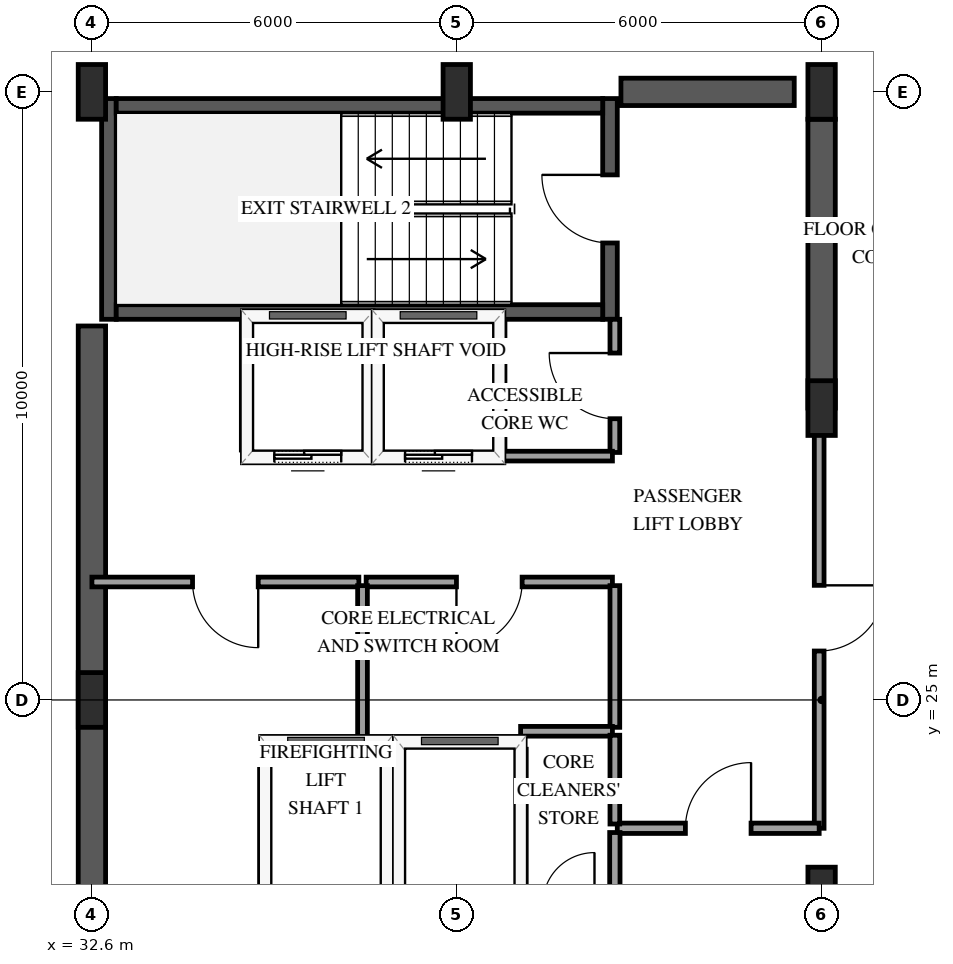
"""IFC4 building model, lengths in metres.
Left out: names, types, materials, properties, quantities, classifications, styles, units other than length and angle.
Written with IfcOpenShell. Run it as: python <this file> out.ifc"""

import sys

from ifc_helpers import new_model, si_unit, direction, frame, frame_2d, origin, origin_2d, place, context, subcontext, project, spatial, rectangle, extrude, element, fill, save


model = new_model("IFC4")
c1 = context("Model", 3, precision=1e-05, world=origin(), true_north=direction((0.0, 1.0)))
c2 = subcontext(c1, "Body", "Model", "MODEL_VIEW")
j1 = project(units=[si_unit("LENGTHUNIT", "METRE"), si_unit("PLANEANGLEUNIT", "RADIAN")], contexts=[c1])
p1 = place(None, origin())
s1 = spatial("IfcSite", under=j1, at=p1, CompositionType="ELEMENT")
p2 = place(p1, origin())
s2 = spatial("IfcBuilding", under=s1, at=p2, CompositionType="ELEMENT")
p3 = place(p2, frame((0.0, 0.0, 261.25)))
s3 = spatial("IfcBuildingStorey", under=s2, at=p3, CompositionType="ELEMENT", Elevation=261.25)
p4 = place(p3, frame((32.88, 31.26, 0.0), z_axis=(0.0, 0.0, 1.0), x_axis=(0.0, 1.0, 0.0)))
e1 = element("IfcWall", 1, at=p4, inside=s3, PredefinedType="SHEAR", context=c2, shape_type="SweptSolid", body=[
    extrude(rectangle(XDim=3.63, YDim=0.24, at=frame_2d((1.815, 0.0))), origin(), (0.0, 0.0, 1.0), 3.75),
])
p5 = place(p3, frame((41.12, 31.26, 0.0), z_axis=(0.0, 0.0, 1.0), x_axis=(0.0, 1.0, 0.0)))
e2 = element("IfcWall", 2, at=p5, inside=s3, PredefinedType="SHEAR", context=c2, shape_type="SweptSolid", body=[
    extrude(rectangle(XDim=3.63, YDim=0.24, at=frame_2d((1.815, 0.0))), origin(), (0.0, 0.0, 1.0), 3.75),
])
p6 = place(p5, frame((1.255, 0.0, 0.0)))
e3 = element("IfcOpeningElement", 3, at=p6, cuts=e2, PredefinedType="OPENING", context=c2, shape_type="SweptSolid", body=[
    extrude(rectangle(XDim=1.12, YDim=2.15, at=frame_2d((0.56, 1.075))), frame((0.0, 0.13, 0.0), z_axis=(0.0, -1.0, 0.0), x_axis=(1.0, 0.0, 0.0)), (0.0, 0.0, 1.0), 0.26),
])
for number, where, z_axis, x_axis in (
    (4, (33.0, 31.38, 0.0), (0.0, 0.0, 1.0), (1.0, 0.0, 0.0)),
    (5, (33.0, 34.77, 0.0), (0.0, 0.0, 1.0), (1.0, 0.0, 0.0)),
):
    element("IfcWall", number, at=place(p3, frame(where, z_axis=z_axis, x_axis=x_axis)), inside=s3, PredefinedType="SHEAR", context=c2, shape_type="SweptSolid", body=[
        extrude(rectangle(XDim=8.0, YDim=0.24, at=frame_2d((4.0, 0.0))), origin(), (0.0, 0.0, 1.0), 3.75),
    ])
p7 = place(p3, frame((32.6, 18.85, 0.0), z_axis=(0.0, 0.0, 1.0), x_axis=(0.0, 1.0, 0.0)))
e6 = element("IfcWall", 6, at=p7, inside=s3, PredefinedType="SHEAR", context=c2, shape_type="SweptSolid", body=[
    extrude(rectangle(XDim=12.3, YDim=0.45, at=frame_2d((6.15, 0.0))), origin(), (0.0, 0.0, 1.0), 3.75),
])
p8 = place(p3, frame((41.3, 35.0, 0.0), z_axis=(0.0, 0.0, 1.0), x_axis=(1.0, 0.0, 0.0)))
e7 = element("IfcWall", 7, at=p8, inside=s3, PredefinedType="SHEAR", context=c2, shape_type="SweptSolid", body=[
    extrude(rectangle(XDim=2.85, YDim=0.45, at=frame_2d((1.425, 0.0))), origin(), (0.0, 0.0, 1.0), 3.75),
])
p9 = place(p3, frame((44.6, 29.8, 0.0), z_axis=(0.0, 0.0, 1.0), x_axis=(0.0, 1.0, 0.0)))
e8 = element("IfcWall", 8, at=p9, inside=s3, PredefinedType="SHEAR", context=c2, shape_type="SweptSolid", body=[
    extrude(rectangle(XDim=4.75, YDim=0.45, at=frame_2d((2.375, 0.0))), origin(), (0.0, 0.0, 1.0), 3.75),
])
for number, where, z_axis, x_axis in (
    (9, (32.6, 25.0, 0.0), (0.0, 0.0, 1.0), (1.0, 0.0, 0.0)),
    (10, (32.6, 35.0, 0.0), (0.0, 0.0, 1.0), (1.0, 0.0, 0.0)),
    (11, (38.6, 35.0, 0.0), (0.0, 0.0, 1.0), (1.0, 0.0, 0.0)),
    (12, (44.6, 21.8, 0.0), (0.0, 0.0, 1.0), (1.0, 0.0, 0.0)),
    (13, (44.6, 29.8, 0.0), (0.0, 0.0, 1.0), (1.0, 0.0, 0.0)),
    (14, (44.6, 35.0, 0.0), (0.0, 0.0, 1.0), (1.0, 0.0, 0.0)),
):
    element("IfcColumn", number, at=place(p3, frame(where, z_axis=z_axis, x_axis=x_axis)), inside=s3, PredefinedType="PILASTER", context=c2, shape_type="SweptSolid", body=[
        extrude(rectangle(XDim=0.45, YDim=0.9, at=origin_2d()), origin(), (0.0, 0.0, 1.0), 3.75),
    ])
p10 = place(p3, frame((35.45, 24.3, 0.0), z_axis=(0.0, 0.0, 1.0), x_axis=(1.0, 0.0, 0.0)))
e15 = element("IfcWall", 15, at=p10, inside=s3, PredefinedType="SOLIDWALL", context=c2, shape_type="SweptSolid", body=[
    extrude(rectangle(XDim=2.0, YDim=0.185, at=frame_2d((1.0, 0.0))), origin(), (0.0, 0.0, 1.0), 3.45),
])
for number, where, z_axis, x_axis in (
    (16, (35.45, 21.81, 0.0), (0.0, 0.0, 1.0), (0.0, 1.0, 0.0)),
    (17, (37.45, 21.81, 0.0), (0.0, 0.0, 1.0), (0.0, 1.0, 0.0)),
):
    element("IfcWall", number, at=place(p3, frame(where, z_axis=z_axis, x_axis=x_axis)), inside=s3, PredefinedType="SOLIDWALL", context=c2, shape_type="SweptSolid", body=[
        extrude(rectangle(XDim=2.38, YDim=0.185, at=frame_2d((1.19, 0.0))), origin(), (0.0, 0.0, 1.0), 3.45),
    ])
p11 = place(p3, frame((37.65, 24.3, 0.0), z_axis=(0.0, 0.0, 1.0), x_axis=(1.0, 0.0, 0.0)))
e18 = element("IfcWall", 18, at=p11, inside=s3, PredefinedType="SOLIDWALL", context=c2, shape_type="SweptSolid", body=[
    extrude(rectangle(XDim=2.0, YDim=0.185, at=frame_2d((1.0, 0.0))), origin(), (0.0, 0.0, 1.0), 3.45),
])
p12 = place(p3, frame((39.65, 21.81, 0.0), z_axis=(0.0, 0.0, 1.0), x_axis=(0.0, 1.0, 0.0)))
e19 = element("IfcWall", 19, at=p12, inside=s3, PredefinedType="SOLIDWALL", context=c2, shape_type="SweptSolid", body=[
    extrude(rectangle(XDim=2.38, YDim=0.185, at=frame_2d((1.19, 0.0))), origin(), (0.0, 0.0, 1.0), 3.45),
])
p13 = place(p3, frame((35.15, 29.0, 0.0), z_axis=(0.0, 0.0, 1.0), x_axis=(1.0, 0.0, 0.0)))
e20 = element("IfcWall", 20, at=p13, inside=s3, PredefinedType="SOLIDWALL", context=c2, shape_type="SweptSolid", body=[
    extrude(rectangle(XDim=2.0, YDim=0.185, at=frame_2d((1.0, 0.0))), origin(), (0.0, 0.0, 1.0), 3.45),
])
p14 = place(p13, frame((0.45, 0.0, 0.0)))
e21 = element("IfcOpeningElement", 21, at=p14, cuts=e20, PredefinedType="OPENING", context=c2, shape_type="SweptSolid", body=[
    extrude(rectangle(XDim=1.1, YDim=2.15, at=frame_2d((0.55, 1.075))), frame((0.0, 0.103, 0.0), z_axis=(0.0, -1.0, 0.0), x_axis=(1.0, 0.0, 0.0)), (0.0, 0.0, 1.0), 0.205),
])
for number, where, z_axis, x_axis in (
    (22, (35.15, 29.11, 0.0), (0.0, 0.0, 1.0), (0.0, 1.0, 0.0)),
    (23, (37.15, 29.11, 0.0), (0.0, 0.0, 1.0), (0.0, 1.0, 0.0)),
):
    element("IfcWall", number, at=place(p3, frame(where, z_axis=z_axis, x_axis=x_axis)), inside=s3, PredefinedType="SOLIDWALL", context=c2, shape_type="SweptSolid", body=[
        extrude(rectangle(XDim=2.1, YDim=0.185, at=frame_2d((1.05, 0.0))), origin(), (0.0, 0.0, 1.0), 3.45),
    ])
p15 = place(p3, frame((37.3, 29.0, 0.0), z_axis=(0.0, 0.0, 1.0), x_axis=(1.0, 0.0, 0.0)))
e24 = element("IfcWall", 24, at=p15, inside=s3, PredefinedType="SOLIDWALL", context=c2, shape_type="SweptSolid", body=[
    extrude(rectangle(XDim=2.0, YDim=0.185, at=frame_2d((1.0, 0.0))), origin(), (0.0, 0.0, 1.0), 3.45),
])
p16 = place(p15, frame((0.45, 0.0, 0.0)))
e25 = element("IfcOpeningElement", 25, at=p16, cuts=e24, PredefinedType="OPENING", context=c2, shape_type="SweptSolid", body=[
    extrude(rectangle(XDim=1.1, YDim=2.15, at=frame_2d((0.55, 1.075))), frame((0.0, 0.103, 0.0), z_axis=(0.0, -1.0, 0.0), x_axis=(1.0, 0.0, 0.0)), (0.0, 0.0, 1.0), 0.205),
])
p17 = place(p3, frame((39.3, 29.11, 0.0), z_axis=(0.0, 0.0, 1.0), x_axis=(0.0, 1.0, 0.0)))
e26 = element("IfcWall", 26, at=p17, inside=s3, PredefinedType="SOLIDWALL", context=c2, shape_type="SweptSolid", body=[
    extrude(rectangle(XDim=2.1, YDim=0.185, at=frame_2d((1.05, 0.0))), origin(), (0.0, 0.0, 1.0), 3.45),
])
p18 = place(p3, frame((44.56, 29.8, 0.0), z_axis=(0.0, 0.0, 1.0), x_axis=(0.0, -1.0, 0.0)))
e27 = element("IfcWall", 27, at=p18, inside=s3, PredefinedType="PARTITIONING", context=c2, shape_type="SweptSolid", body=[
    extrude(rectangle(XDim=6.91, YDim=0.16, at=frame_2d((3.455, 0.0))), origin(), (0.0, 0.0, 1.0), 2.49),
])
p19 = place(p18, frame((2.915, 0.0, 0.0)))
e28 = element("IfcOpeningElement", 28, at=p19, cuts=e27, PredefinedType="OPENING", context=c2, shape_type="SweptSolid", body=[
    extrude(rectangle(XDim=1.08, YDim=2.15, at=frame_2d((0.54, 1.075))), frame((0.0, 0.09, 0.0), z_axis=(0.0, -1.0, 0.0), x_axis=(1.0, 0.0, 0.0)), (0.0, 0.0, 1.0), 0.18),
])
p20 = place(p3, frame((36.99, 26.94, 0.0), z_axis=(0.0, 0.0, 1.0), x_axis=(-1.0, 0.0, 0.0)))
e29 = element("IfcWall", 29, at=p20, inside=s3, PredefinedType="PARTITIONING", context=c2, shape_type="SweptSolid", body=[
    extrude(rectangle(XDim=4.39, YDim=0.16, at=frame_2d((2.195, 0.0))), origin(), (0.0, 0.0, 1.0), 3.45),
])
p21 = place(p20, frame((1.655, 0.0, 0.0)))
e30 = element("IfcOpeningElement", 30, at=p21, cuts=e29, PredefinedType="OPENING", context=c2, shape_type="SweptSolid", body=[
    extrude(rectangle(XDim=1.08, YDim=2.15, at=frame_2d((0.54, 1.075))), frame((0.0, 0.09, 0.0), z_axis=(0.0, -1.0, 0.0), x_axis=(1.0, 0.0, 0.0)), (0.0, 0.0, 1.0), 0.18),
])
p22 = place(p3, frame((41.16, 26.94, 0.0), z_axis=(0.0, 0.0, 1.0), x_axis=(-1.0, 0.0, 0.0)))
e31 = element("IfcWall", 31, at=p22, inside=s3, PredefinedType="PARTITIONING", context=c2, shape_type="SweptSolid", body=[
    extrude(rectangle(XDim=4.05, YDim=0.16, at=frame_2d((2.025, 0.0))), origin(), (0.0, 0.0, 1.0), 3.45),
])
p23 = place(p22, frame((1.485, 0.0, 0.0)))
e32 = element("IfcOpeningElement", 32, at=p23, cuts=e31, PredefinedType="OPENING", context=c2, shape_type="SweptSolid", body=[
    extrude(rectangle(XDim=1.08, YDim=2.15, at=frame_2d((0.54, 1.075))), frame((0.0, 0.09, 0.0), z_axis=(0.0, -1.0, 0.0), x_axis=(1.0, 0.0, 0.0)), (0.0, 0.0, 1.0), 0.18),
])
p24 = place(p3, frame((41.24, 22.89, 0.0), z_axis=(0.0, 0.0, 1.0), x_axis=(1.0, 0.0, 0.0)))
e33 = element("IfcWall", 33, at=p24, inside=s3, PredefinedType="PARTITIONING", context=c2, shape_type="SweptSolid", body=[
    extrude(rectangle(XDim=3.32, YDim=0.17, at=frame_2d((1.66, 0.0))), origin(), (0.0, 0.0, 1.0), 3.45),
])
p25 = place(p24, frame((1.12, 0.0, 0.0)))
e34 = element("IfcOpeningElement", 34, at=p25, cuts=e33, PredefinedType="OPENING", context=c2, shape_type="SweptSolid", body=[
    extrude(rectangle(XDim=1.08, YDim=2.15, at=frame_2d((0.54, 1.075))), frame((0.0, 0.095, 0.0), z_axis=(0.0, -1.0, 0.0), x_axis=(1.0, 0.0, 0.0)), (0.0, 0.0, 1.0), 0.19),
])
p26 = place(p3, frame((37.05, 26.88, 0.0), z_axis=(0.0, 0.0, 1.0), x_axis=(0.0, -1.0, 0.0)))
e35 = element("IfcWall", 35, at=p26, inside=s3, PredefinedType="PARTITIONING", context=c2, shape_type="SweptSolid", body=[
    extrude(rectangle(XDim=2.58, YDim=0.16, at=frame_2d((1.29, 0.0))), origin(), (0.0, 0.0, 1.0), 3.45),
])
p27 = place(p3, frame((41.2, 24.55, 0.0), z_axis=(0.0, 0.0, 1.0), x_axis=(0.0, 1.0, 0.0)))
e36 = element("IfcWall", 36, at=p27, inside=s3, PredefinedType="PARTITIONING", context=c2, shape_type="SweptSolid", body=[
    extrude(rectangle(XDim=2.33, YDim=0.16, at=frame_2d((1.165, 0.0))), origin(), (0.0, 0.0, 1.0), 3.45),
])
p28 = place(p3, frame((41.2, 29.07, 0.0), z_axis=(0.0, 0.0, 1.0), x_axis=(0.0, 1.0, 0.0)))
e37 = element("IfcWall", 37, at=p28, inside=s3, PredefinedType="PARTITIONING", context=c2, shape_type="SweptSolid", body=[
    extrude(rectangle(XDim=2.19, YDim=0.16, at=frame_2d((1.095, 0.0))), origin(), (0.0, 0.0, 1.0), 3.45),
])
p29 = place(p28, frame((0.555, 0.0, 0.0)))
e38 = element("IfcOpeningElement", 38, at=p29, cuts=e37, PredefinedType="OPENING", context=c2, shape_type="SweptSolid", body=[
    extrude(rectangle(XDim=1.08, YDim=2.15, at=frame_2d((0.54, 1.075))), frame((0.0, 0.09, 0.0), z_axis=(0.0, -1.0, 0.0), x_axis=(1.0, 0.0, 0.0)), (0.0, 0.0, 1.0), 0.18),
])
p30 = place(p3, frame((39.3, 29.01, 0.0), z_axis=(0.0, 0.0, 1.0), x_axis=(1.0, 0.0, 0.0)))
e39 = element("IfcWall", 39, at=p30, inside=s3, PredefinedType="PARTITIONING", context=c2, shape_type="SweptSolid", body=[
    extrude(rectangle(XDim=1.86, YDim=0.16, at=frame_2d((0.93, 0.0))), origin(), (0.0, 0.0, 1.0), 3.45),
])
p31 = place(p3, frame((39.65, 24.485, 0.0), z_axis=(0.0, 0.0, 1.0), x_axis=(1.0, 0.0, 0.0)))
e40 = element("IfcWall", 40, at=p31, inside=s3, PredefinedType="PARTITIONING", context=c2, shape_type="SweptSolid", body=[
    extrude(rectangle(XDim=1.51, YDim=0.16, at=frame_2d((0.755, 0.0))), origin(), (0.0, 0.0, 1.0), 3.45),
])
p32 = place(p3, frame((41.2, 22.96, 0.0), z_axis=(0.0, 0.0, 1.0), x_axis=(0.0, 1.0, 0.0)))
e41 = element("IfcWall", 41, at=p32, inside=s3, PredefinedType="PARTITIONING", context=c2, shape_type="SweptSolid", body=[
    extrude(rectangle(XDim=1.46, YDim=0.16, at=frame_2d((0.73, 0.0))), origin(), (0.0, 0.0, 1.0), 3.45),
])
p33 = place(p3, frame((41.2, 21.7, 0.0), z_axis=(0.0, 0.0, 1.0), x_axis=(0.0, 1.0, 0.0)))
e42 = element("IfcWall", 42, at=p33, inside=s3, PredefinedType="PARTITIONING", context=c2, shape_type="SweptSolid", body=[
    extrude(rectangle(XDim=1.12, YDim=0.17, at=frame_2d((0.56, 0.0))), origin(), (0.0, 0.0, 1.0), 3.45),
])
p34 = place(p14, origin())
e43 = element("IfcDoor", 43, at=p34, inside=s3, OperationType="SLIDING_TO_LEFT", PredefinedType="DOOR", context=c2, shape_type="SweptSolid", body=[
    extrude(rectangle(XDim=1.1, YDim=2.15, at=frame_2d((0.55, 1.075))), frame((0.0, 0.025, 0.0), z_axis=(0.0, -1.0, 0.0), x_axis=(1.0, 0.0, 0.0)), (0.0, 0.0, 1.0), 0.05),
])
fill(e21, e43)
p35 = place(p16, origin())
e44 = element("IfcDoor", 44, at=p35, inside=s3, OperationType="SLIDING_TO_LEFT", PredefinedType="DOOR", context=c2, shape_type="SweptSolid", body=[
    extrude(rectangle(XDim=1.1, YDim=2.15, at=frame_2d((0.55, 1.075))), frame((0.0, 0.025, 0.0), z_axis=(0.0, -1.0, 0.0), x_axis=(1.0, 0.0, 0.0)), (0.0, 0.0, 1.0), 0.05),
])
fill(e25, e44)
p36 = place(p6, origin())
e45 = element("IfcDoor", 45, at=p36, inside=s3, OperationType="SINGLE_SWING_RIGHT", PredefinedType="DOOR", context=c2, shape_type="SweptSolid", body=[
    extrude(rectangle(XDim=1.12, YDim=2.15, at=frame_2d((0.56, 1.075))), frame((0.0, 0.025, 0.0), z_axis=(0.0, -1.0, 0.0), x_axis=(1.0, 0.0, 0.0)), (0.0, 0.0, 1.0), 0.05),
])
fill(e3, e45)
p37 = place(p19, origin())
e46 = element("IfcDoor", 46, at=p37, inside=s3, OperationType="SINGLE_SWING_LEFT", PredefinedType="DOOR", context=c2, shape_type="SweptSolid", body=[
    extrude(rectangle(XDim=1.08, YDim=2.15, at=frame_2d((0.54, 1.075))), frame((0.0, 0.025, 0.0), z_axis=(0.0, -1.0, 0.0), x_axis=(1.0, 0.0, 0.0)), (0.0, 0.0, 1.0), 0.05),
])
fill(e28, e46)
p38 = place(p21, origin())
e47 = element("IfcDoor", 47, at=p38, inside=s3, OperationType="SINGLE_SWING_LEFT", PredefinedType="DOOR", context=c2, shape_type="SweptSolid", body=[
    extrude(rectangle(XDim=1.08, YDim=2.15, at=frame_2d((0.54, 1.075))), frame((0.0, 0.025, 0.0), z_axis=(0.0, -1.0, 0.0), x_axis=(1.0, 0.0, 0.0)), (0.0, 0.0, 1.0), 0.05),
])
fill(e30, e47)
p39 = place(p23, origin())
e48 = element("IfcDoor", 48, at=p39, inside=s3, OperationType="SINGLE_SWING_RIGHT", PredefinedType="DOOR", context=c2, shape_type="SweptSolid", body=[
    extrude(rectangle(XDim=1.08, YDim=2.15, at=frame_2d((0.54, 1.075))), frame((0.0, 0.025, 0.0), z_axis=(0.0, -1.0, 0.0), x_axis=(1.0, 0.0, 0.0)), (0.0, 0.0, 1.0), 0.05),
])
fill(e32, e48)
p40 = place(p25, origin())
e49 = element("IfcDoor", 49, at=p40, inside=s3, OperationType="SINGLE_SWING_RIGHT", PredefinedType="DOOR", context=c2, shape_type="SweptSolid", body=[
    extrude(rectangle(XDim=1.08, YDim=2.15, at=frame_2d((0.54, 1.075))), frame((0.0, 0.025, 0.0), z_axis=(0.0, -1.0, 0.0), x_axis=(1.0, 0.0, 0.0)), (0.0, 0.0, 1.0), 0.05),
])
fill(e34, e49)
p41 = place(p29, origin())
e50 = element("IfcDoor", 50, at=p41, inside=s3, OperationType="SINGLE_SWING_RIGHT", PredefinedType="DOOR", context=c2, shape_type="SweptSolid", body=[
    extrude(rectangle(XDim=1.08, YDim=2.15, at=frame_2d((0.54, 1.075))), frame((0.0, 0.025, 0.0), z_axis=(0.0, -1.0, 0.0), x_axis=(1.0, 0.0, 0.0)), (0.0, 0.0, 1.0), 0.05),
])
fill(e38, e50)
save(model, sys.argv[1])
